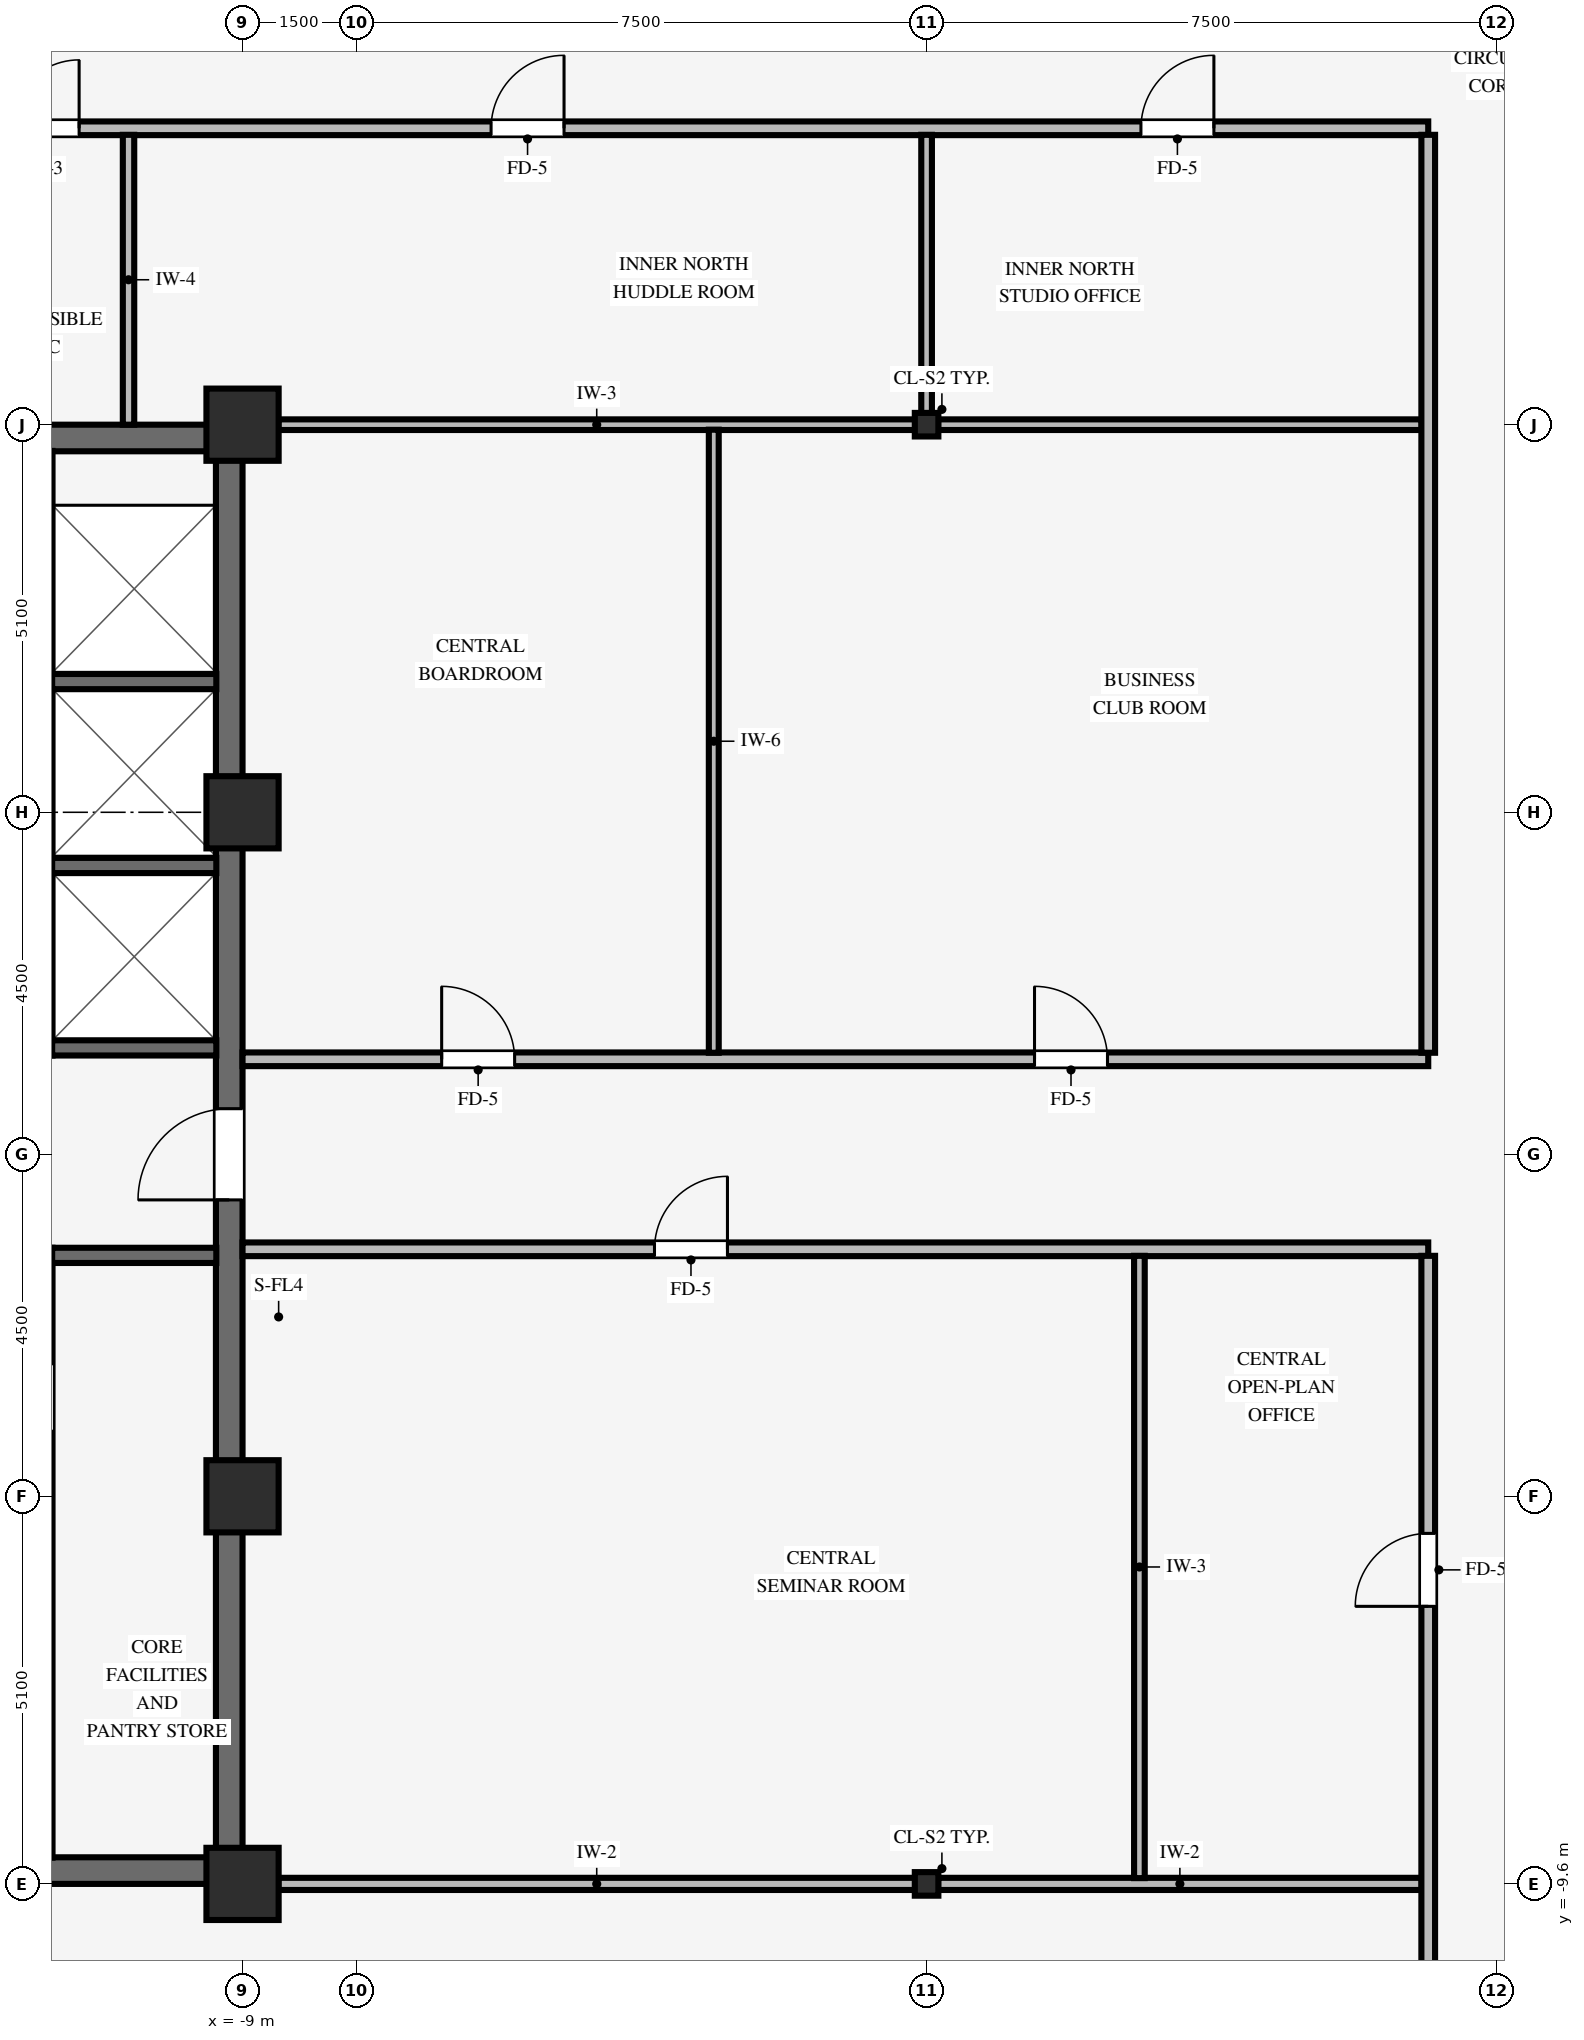
"""IFC4 building model, lengths in metres.
Left out: names, types, materials, properties, quantities, classifications, styles, units other than length and angle.
Written with IfcOpenShell. Run it as: python <this file> out.ifc"""

import sys

from ifc_helpers import new_model, si_unit, direction, frame, frame_2d, origin, origin_2d, place, context, subcontext, project, spatial, rectangle, i_section, extrude, source, transform, mapped, element, fill, save


model = new_model("IFC4")
c1 = context("Model", 3, precision=1e-05, world=origin(), true_north=direction((0.0, 1.0)))
c2 = subcontext(c1, "Body", "Model", "MODEL_VIEW")
j1 = project(units=[si_unit("LENGTHUNIT", "METRE"), si_unit("PLANEANGLEUNIT", "RADIAN")], contexts=[c1])
p1 = place(None, origin())
s1 = spatial("IfcSite", under=j1, at=p1, CompositionType="ELEMENT")
p2 = place(p1, origin())
s2 = spatial("IfcBuilding", under=s1, at=p2, CompositionType="ELEMENT")
p3 = place(p2, frame((0.0, 0.0, 194.55)))
s3 = spatial("IfcBuildingStorey", under=s2, at=p3, CompositionType="ELEMENT", Elevation=194.55)
for number, where, z_axis, x_axis in (
    (1, (-17.5, -9.425, 0.0), (0.0, 0.0, 1.0), (1.0, 0.0, 0.0)),
    (2, (-17.5, 9.425, 0.0), (0.0, 0.0, 1.0), (1.0, 0.0, 0.0)),
):
    element("IfcWall", number, at=place(p3, frame(where, z_axis=z_axis, x_axis=x_axis)), inside=s3, PredefinedType="SHEAR", context=c2, shape_type="SweptSolid", body=[
        extrude(rectangle(XDim=8.5, YDim=0.35, at=frame_2d((4.25, 0.0))), origin(), (0.0, 0.0, 1.0), 3.37),
    ])
p4 = place(p3, frame((-9.175, -9.255, 0.0), z_axis=(0.0, 0.0, 1.0), x_axis=(0.0, 1.0, 0.0)))
e3 = element("IfcWall", 3, at=p4, inside=s3, PredefinedType="SHEAR", context=c2, shape_type="SweptSolid", body=[
    extrude(rectangle(XDim=18.51, YDim=0.35, at=frame_2d((9.255, 0.0))), origin(), (0.0, 0.0, 1.0), 3.37),
])
p5 = place(p4, frame((8.655, 0.0, 0.0)))
e4 = element("IfcOpeningElement", 4, at=p5, cuts=e3, PredefinedType="OPENING", context=c2, shape_type="SweptSolid", body=[
    extrude(rectangle(XDim=1.2, YDim=2.15, at=frame_2d((0.6, 1.075))), frame((0.0, 0.185, 0.0), z_axis=(0.0, -1.0, 0.0), x_axis=(1.0, 0.0, 0.0)), (0.0, 0.0, 1.0), 0.37),
])
for number, where, z_axis, x_axis in (
    (5, (-9.0, -9.6, 0.0), (0.0, 0.0, 1.0), (1.0, 0.0, 0.0)),
    (6, (-9.0, -4.5, 0.0), (0.0, 0.0, 1.0), (1.0, 0.0, 0.0)),
    (7, (-9.0, 4.5, 0.0), (0.0, 0.0, 1.0), (1.0, 0.0, 0.0)),
    (8, (-9.0, 9.6, 0.0), (0.0, 0.0, 1.0), (1.0, 0.0, 0.0)),
):
    element("IfcColumn", number, at=place(p3, frame(where, z_axis=z_axis, x_axis=x_axis)), inside=s3, PredefinedType="COLUMN", context=c2, shape_type="SweptSolid", body=[
        extrude(rectangle(XDim=0.95, YDim=0.95, at=origin_2d()), origin(), (0.0, 0.0, 1.0), 3.37),
    ])
for number, where, z_axis, x_axis in (
    (9, (0.0, -9.6, 0.0), (0.0, 0.0, 1.0), (1.0, 0.0, 0.0)),
    (10, (0.0, 9.6, 0.0), (0.0, 0.0, 1.0), (1.0, 0.0, 0.0)),
):
    element("IfcColumn", number, at=place(p3, frame(where, z_axis=z_axis, x_axis=x_axis)), inside=s3, PredefinedType="COLUMN", context=c2, shape_type="SweptSolid", body=[
        extrude(i_section(OverallWidth=0.31, OverallDepth=0.31, WebThickness=0.015, FlangeThickness=0.015, FilletRadius=0.015, at=origin_2d()), origin(), (0.0, 0.0, 1.0), 3.37),
    ])
for number, where, z_axis, x_axis in (
    (11, (-11.505, -1.33, 0.0), (0.0, 0.0, 1.0), (1.0, 0.0, 0.0)),
    (12, (-11.505, 1.4, 0.0), (0.0, 0.0, 1.0), (1.0, 0.0, 0.0)),
    (13, (-11.505, 3.8, 0.0), (0.0, 0.0, 1.0), (1.0, 0.0, 0.0)),
    (14, (-11.505, 6.22, 0.0), (0.0, 0.0, 1.0), (1.0, 0.0, 0.0)),
):
    element("IfcWall", number, at=place(p3, frame(where, z_axis=z_axis, x_axis=x_axis)), inside=s3, PredefinedType="SHEAR", context=c2, shape_type="SweptSolid", body=[
        extrude(rectangle(XDim=2.16, YDim=0.2, at=frame_2d((1.08, 0.0))), origin(), (0.0, 0.0, 1.0), 3.37),
    ])
p6 = place(p3, frame((-8.529, -9.6, 0.0), z_axis=(0.0, 0.0, 1.0), x_axis=(1.0, 0.0, 0.0)))
e15 = element("IfcWall", 15, at=p6, inside=s3, PredefinedType="PARTITIONING", context=c2, shape_type="SweptSolid", body=[
    extrude(rectangle(XDim=8.378, YDim=0.16, at=frame_2d((4.189, 0.0))), origin(), (0.0, 0.0, 1.0), 2.405),
])
p7 = place(p3, frame((0.151, -9.6, 0.0), z_axis=(0.0, 0.0, 1.0), x_axis=(1.0, 0.0, 0.0)))
e16 = element("IfcWall", 16, at=p7, inside=s3, PredefinedType="PARTITIONING", context=c2, shape_type="SweptSolid", body=[
    extrude(rectangle(XDim=6.363, YDim=0.16, at=frame_2d((3.182, 0.0))), origin(), (0.0, 0.0, 1.0), 2.405),
])
p8 = place(p3, frame((-9.0, -1.25, 0.0), z_axis=(0.0, 0.0, 1.0), x_axis=(1.0, 0.0, 0.0)))
e17 = element("IfcWall", 17, at=p8, inside=s3, PredefinedType="PARTITIONING", context=c2, shape_type="SweptSolid", body=[
    extrude(rectangle(XDim=15.6, YDim=0.18, at=frame_2d((7.8, 0.0))), origin(), (0.0, 0.0, 1.0), 3.36),
])
p9 = place(p8, frame((5.42, 0.0, 0.0)))
e18 = element("IfcOpeningElement", 18, at=p9, cuts=e17, PredefinedType="OPENING", context=c2, shape_type="SweptSolid", body=[
    extrude(rectangle(XDim=0.96, YDim=2.1, at=frame_2d((0.48, 1.05))), frame((0.0, 0.1, 0.0), z_axis=(0.0, -1.0, 0.0), x_axis=(1.0, 0.0, 0.0)), (0.0, 0.0, 1.0), 0.2),
])
p10 = place(p3, frame((-9.0, 1.25, 0.0), z_axis=(0.0, 0.0, 1.0), x_axis=(1.0, 0.0, 0.0)))
e19 = element("IfcWall", 19, at=p10, inside=s3, PredefinedType="PARTITIONING", context=c2, shape_type="SweptSolid", body=[
    extrude(rectangle(XDim=15.6, YDim=0.18, at=frame_2d((7.8, 0.0))), origin(), (0.0, 0.0, 1.0), 3.36),
])
p11 = place(p10, frame((10.42, 0.0, 0.0)))
e20 = element("IfcOpeningElement", 20, at=p11, cuts=e19, PredefinedType="OPENING", context=c2, shape_type="SweptSolid", body=[
    extrude(rectangle(XDim=0.96, YDim=2.1, at=frame_2d((0.48, 1.05))), frame((0.0, 0.1, 0.0), z_axis=(0.0, -1.0, 0.0), x_axis=(1.0, 0.0, 0.0)), (0.0, 0.0, 1.0), 0.2),
])
p12 = place(p10, frame((2.62, 0.0, 0.0)))
e21 = element("IfcOpeningElement", 21, at=p12, cuts=e19, PredefinedType="OPENING", context=c2, shape_type="SweptSolid", body=[
    extrude(rectangle(XDim=0.96, YDim=2.1, at=frame_2d((0.48, 1.05))), frame((0.0, 0.1, 0.0), z_axis=(0.0, -1.0, 0.0), x_axis=(1.0, 0.0, 0.0)), (0.0, 0.0, 1.0), 0.2),
])
p13 = place(p3, frame((-8.529, 9.6, 0.0), z_axis=(0.0, 0.0, 1.0), x_axis=(1.0, 0.0, 0.0)))
e22 = element("IfcWall", 22, at=p13, inside=s3, PredefinedType="PARTITIONING", context=c2, shape_type="SweptSolid", body=[
    extrude(rectangle(XDim=8.378, YDim=0.14, at=frame_2d((4.189, 0.0))), origin(), (0.0, 0.0, 1.0), 2.405),
])
p14 = place(p3, frame((0.151, 9.6, 0.0), z_axis=(0.0, 0.0, 1.0), x_axis=(1.0, 0.0, 0.0)))
e23 = element("IfcWall", 23, at=p14, inside=s3, PredefinedType="PARTITIONING", context=c2, shape_type="SweptSolid", body=[
    extrude(rectangle(XDim=6.363, YDim=0.14, at=frame_2d((3.182, 0.0))), origin(), (0.0, 0.0, 1.0), 2.405),
])
p15 = place(p3, frame((-17.7, 13.5, 0.0), z_axis=(0.0, 0.0, 1.0), x_axis=(1.0, 0.0, 0.0)))
e24 = element("IfcWall", 24, at=p15, inside=s3, PredefinedType="PARTITIONING", context=c2, shape_type="SweptSolid", body=[
    extrude(rectangle(XDim=24.3, YDim=0.18, at=frame_2d((12.15, 0.0))), origin(), (0.0, 0.0, 1.0), 3.008),
])
p16 = place(p15, frame((11.97, 0.0, 0.0)))
e25 = element("IfcOpeningElement", 25, at=p16, cuts=e24, PredefinedType="OPENING", context=c2, shape_type="SweptSolid", body=[
    extrude(rectangle(XDim=0.96, YDim=2.1, at=frame_2d((0.48, 1.05))), frame((0.0, 0.1, 0.0), z_axis=(0.0, -1.0, 0.0), x_axis=(1.0, 0.0, 0.0)), (0.0, 0.0, 1.0), 0.2),
])
p17 = place(p15, frame((20.52, 0.0, 0.0)))
e26 = element("IfcOpeningElement", 26, at=p17, cuts=e24, PredefinedType="OPENING", context=c2, shape_type="SweptSolid", body=[
    extrude(rectangle(XDim=0.96, YDim=2.1, at=frame_2d((0.48, 1.05))), frame((0.0, 0.1, 0.0), z_axis=(0.0, -1.0, 0.0), x_axis=(1.0, 0.0, 0.0)), (0.0, 0.0, 1.0), 0.2),
])
p18 = place(p15, frame((3.3, 0.0, 0.0)))
e27 = element("IfcOpeningElement", 27, at=p18, cuts=e24, PredefinedType="OPENING", context=c2, shape_type="SweptSolid", body=[
    extrude(rectangle(XDim=0.9, YDim=2.1, at=frame_2d((0.45, 1.05))), frame((0.0, 0.1, 0.0), z_axis=(0.0, -1.0, 0.0), x_axis=(1.0, 0.0, 0.0)), (0.0, 0.0, 1.0), 0.2),
])
p19 = place(p15, frame((5.65, 0.0, 0.0)))
e28 = element("IfcOpeningElement", 28, at=p19, cuts=e24, PredefinedType="OPENING", context=c2, shape_type="SweptSolid", body=[
    extrude(rectangle(XDim=0.9, YDim=2.1, at=frame_2d((0.45, 1.05))), frame((0.0, 0.1, 0.0), z_axis=(0.0, -1.0, 0.0), x_axis=(1.0, 0.0, 0.0)), (0.0, 0.0, 1.0), 0.2),
])
p20 = place(p3, frame((-10.5, 9.6, 0.0), z_axis=(0.0, 0.0, 1.0), x_axis=(0.0, 1.0, 0.0)))
e29 = element("IfcWall", 29, at=p20, inside=s3, PredefinedType="PARTITIONING", context=c2, shape_type="SweptSolid", body=[
    extrude(rectangle(XDim=3.814, YDim=0.15, at=frame_2d((1.907, 0.0))), origin(), (0.0, 0.0, 1.0), 3.36),
])
p21 = place(p3, frame((-2.8, 1.336, 0.0), z_axis=(0.0, 0.0, 1.0), x_axis=(0.0, 1.0, 0.0)))
e30 = element("IfcWall", 30, at=p21, inside=s3, PredefinedType="PARTITIONING", context=c2, shape_type="SweptSolid", body=[
    extrude(rectangle(XDim=8.198, YDim=0.13, at=frame_2d((4.099, 0.0))), origin(), (0.0, 0.0, 1.0), 3.36),
])
p22 = place(p3, frame((0.0, 9.751, 0.0), z_axis=(0.0, 0.0, 1.0), x_axis=(0.0, 1.0, 0.0)))
e31 = element("IfcWall", 31, at=p22, inside=s3, PredefinedType="PARTITIONING", context=c2, shape_type="SweptSolid", body=[
    extrude(rectangle(XDim=3.663, YDim=0.14, at=frame_2d((1.832, 0.0))), origin(), (0.0, 0.0, 1.0), 2.816),
])
p23 = place(p3, frame((2.8, -9.524, 0.0), z_axis=(0.0, 0.0, 1.0), x_axis=(0.0, 1.0, 0.0)))
e32 = element("IfcWall", 32, at=p23, inside=s3, PredefinedType="PARTITIONING", context=c2, shape_type="SweptSolid", body=[
    extrude(rectangle(XDim=8.188, YDim=0.14, at=frame_2d((4.094, 0.0))), origin(), (0.0, 0.0, 1.0), 3.36),
])
p24 = place(p3, frame((6.6, -13.414, 0.0), z_axis=(0.0, 0.0, 1.0), x_axis=(0.0, 1.0, 0.0)))
e33 = element("IfcWall", 33, at=p24, inside=s3, PredefinedType="PARTITIONING", context=c2, shape_type="SweptSolid", body=[
    extrude(rectangle(XDim=12.078, YDim=0.18, at=frame_2d((6.039, 0.0))), origin(), (0.0, 0.0, 1.0), 3.36),
])
p25 = place(p24, frame((7.466, 0.0, 0.0)))
e34 = element("IfcOpeningElement", 34, at=p25, cuts=e33, PredefinedType="OPENING", context=c2, shape_type="SweptSolid", body=[
    extrude(rectangle(XDim=0.96, YDim=2.1, at=frame_2d((0.48, 1.05))), frame((0.0, 0.1, 0.0), z_axis=(0.0, -1.0, 0.0), x_axis=(1.0, 0.0, 0.0)), (0.0, 0.0, 1.0), 0.2),
])
p26 = place(p3, frame((6.6, 1.336, 0.0), z_axis=(0.0, 0.0, 1.0), x_axis=(0.0, 1.0, 0.0)))
e35 = element("IfcWall", 35, at=p26, inside=s3, PredefinedType="PARTITIONING", context=c2, shape_type="SweptSolid", body=[
    extrude(rectangle(XDim=12.078, YDim=0.18, at=frame_2d((6.039, 0.0))), origin(), (0.0, 0.0, 1.0), 3.36),
])
m1 = source(origin(), c2, "Body", "SweptSolid", [
    extrude(rectangle(XDim=1.2, YDim=2.15, at=frame_2d((0.6, 1.075))), frame((0.0, 0.025, 0.0), z_axis=(0.0, -1.0, 0.0), x_axis=(1.0, 0.0, 0.0)), (0.0, 0.0, 1.0), 0.05),
])
p27 = place(p5, origin())
e36 = element("IfcDoor", 36, at=p27, inside=s3, OperationType="SINGLE_SWING_LEFT", PredefinedType="DOOR", context=c2, shape_type="MappedRepresentation", body=[
    mapped(m1, transform((0.0, 0.0, 0.0), scale=1.0)),
])
fill(e4, e36)
m2 = source(origin(), c2, "Body", "SweptSolid", [
    extrude(rectangle(XDim=0.96, YDim=2.1, at=frame_2d((0.48, 1.05))), frame((0.0, 0.025, 0.0), z_axis=(0.0, -1.0, 0.0), x_axis=(1.0, 0.0, 0.0)), (0.0, 0.0, 1.0), 0.05),
])
p28 = place(p9, origin())
e37 = element("IfcDoor", 37, at=p28, inside=s3, OperationType="SINGLE_SWING_RIGHT", PredefinedType="DOOR", context=c2, shape_type="MappedRepresentation", body=[
    mapped(m2, transform((0.0, 0.0, 0.0), scale=1.0)),
])
fill(e18, e37)
p29 = place(p16, origin())
e38 = element("IfcDoor", 38, at=p29, inside=s3, OperationType="SINGLE_SWING_RIGHT", PredefinedType="DOOR", context=c2, shape_type="MappedRepresentation", body=[
    mapped(m2, transform((0.0, 0.0, 0.0), scale=1.0)),
])
fill(e25, e38)
p30 = place(p11, origin())
e39 = element("IfcDoor", 39, at=p30, inside=s3, OperationType="SINGLE_SWING_LEFT", PredefinedType="DOOR", context=c2, shape_type="MappedRepresentation", body=[
    mapped(m2, transform((0.0, 0.0, 0.0), scale=1.0)),
])
fill(e20, e39)
p31 = place(p25, origin())
e40 = element("IfcDoor", 40, at=p31, inside=s3, OperationType="SINGLE_SWING_LEFT", PredefinedType="DOOR", context=c2, shape_type="MappedRepresentation", body=[
    mapped(m2, transform((0.0, 0.0, 0.0), scale=1.0)),
])
fill(e34, e40)
p32 = place(p17, origin())
e41 = element("IfcDoor", 41, at=p32, inside=s3, OperationType="SINGLE_SWING_RIGHT", PredefinedType="DOOR", context=c2, shape_type="MappedRepresentation", body=[
    mapped(m2, transform((0.0, 0.0, 0.0), scale=1.0)),
])
fill(e26, e41)
p33 = place(p12, origin())
e42 = element("IfcDoor", 42, at=p33, inside=s3, OperationType="SINGLE_SWING_LEFT", PredefinedType="DOOR", context=c2, shape_type="MappedRepresentation", body=[
    mapped(m2, transform((0.0, 0.0, 0.0), scale=1.0)),
])
fill(e21, e42)
m3 = source(origin(), c2, "Body", "SweptSolid", [
    extrude(rectangle(XDim=0.9, YDim=2.1, at=frame_2d((0.45, 1.05))), frame((0.0, 0.025, 0.0), z_axis=(0.0, -1.0, 0.0), x_axis=(1.0, 0.0, 0.0)), (0.0, 0.0, 1.0), 0.05),
])
p34 = place(p19, origin())
e43 = element("IfcDoor", 43, at=p34, inside=s3, OperationType="SINGLE_SWING_RIGHT", PredefinedType="DOOR", context=c2, shape_type="MappedRepresentation", body=[
    mapped(m3, transform((0.0, 0.0, 0.0), scale=1.0)),
])
fill(e28, e43)
save(model, sys.argv[1])
